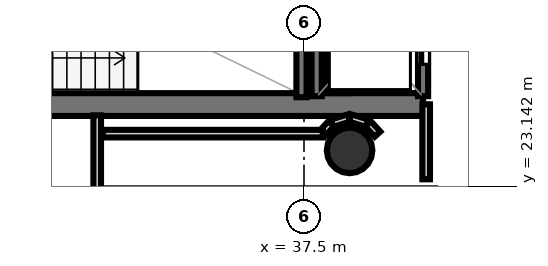
"""IFC4 building model, lengths in metres.
Left out: names, types, materials, properties, quantities, classifications, styles, units other than length and angle.
Written with IfcOpenShell. Run it as: python <this file> out.ifc"""

import sys

from ifc_helpers import new_model, si_unit, direction, frame, frame_2d, origin, origin_2d, place, context, subcontext, project, spatial, rectangle, hollow_circle, extrude, element, fill, save


model = new_model("IFC4")
c1 = context("Model", 3, precision=1e-05, world=origin(), true_north=direction((0.0, 1.0)))
c2 = subcontext(c1, "Body", "Model", "MODEL_VIEW")
j1 = project(units=[si_unit("LENGTHUNIT", "METRE"), si_unit("PLANEANGLEUNIT", "RADIAN")], contexts=[c1])
p1 = place(None, origin())
s1 = spatial("IfcSite", under=j1, at=p1, CompositionType="ELEMENT")
p2 = place(p1, origin())
s2 = spatial("IfcBuilding", under=s1, at=p2, CompositionType="ELEMENT")
p3 = place(p2, frame((0.0, 0.0, 299.1)))
s3 = spatial("IfcBuildingStorey", under=s2, at=p3, CompositionType="ELEMENT", Elevation=299.1)
p4 = place(p3, frame((29.33, 24.755, 0.0), z_axis=(0.0, 0.0, 1.0), x_axis=(1.0, 0.0, 0.0)))
e1 = element("IfcWall", 1, at=p4, inside=s3, PredefinedType="SHEAR", context=c2, shape_type="SweptSolid", body=[
    extrude(rectangle(XDim=10.52, YDim=0.45, at=frame_2d((5.26, 0.0))), origin(), (0.0, 0.0, 1.0), 3.52),
])
p5 = place(p4, frame((0.695, 0.0, 0.0)))
e2 = element("IfcOpeningElement", 2, at=p5, cuts=e1, PredefinedType="OPENING", context=c2, shape_type="SweptSolid", body=[
    extrude(rectangle(XDim=1.25, YDim=2.15, at=frame_2d((0.625, 1.075))), frame((0.0, 0.235, 0.0), z_axis=(0.0, -1.0, 0.0), x_axis=(1.0, 0.0, 0.0)), (0.0, 0.0, 1.0), 0.47),
])
p6 = place(p3, frame((38.18, 24.98, 0.0), z_axis=(0.0, 0.0, 1.0), x_axis=(0.0, 1.0, 0.0)))
e3 = element("IfcWall", 3, at=p6, inside=s3, PredefinedType="SHEAR", context=c2, shape_type="SweptSolid", body=[
    extrude(rectangle(XDim=7.44, YDim=0.45, at=frame_2d((3.72, 0.0))), origin(), (0.0, 0.0, 1.0), 3.52),
])
p7 = place(p3, frame((38.4, 23.85, 0.0), z_axis=(0.0, 0.0, 1.0), x_axis=(1.0, 0.0, 0.0)))
e4 = element("IfcColumn", 4, at=p7, inside=s3, PredefinedType="COLUMN", context=c2, shape_type="SweptSolid", body=[
    extrude(hollow_circle(Radius=0.45, WallThickness=0.025, at=origin_2d()), origin(), (0.0, 0.0, 1.0), 3.7),
])
p8 = place(p3, frame((37.45, 24.9, 0.0), z_axis=(0.0, 0.0, 1.0), x_axis=(0.0, 1.0, 0.0)))
e5 = element("IfcWall", 5, at=p8, inside=s3, PredefinedType="SOLIDWALL", context=c2, shape_type="SweptSolid", body=[
    extrude(rectangle(XDim=3.06, YDim=0.2, at=frame_2d((1.53, 0.0))), origin(), (0.0, 0.0, 1.0), 3.52),
])
p9 = place(p3, frame((39.85, 24.92, 0.0), z_axis=(0.0, 0.0, 1.0), x_axis=(0.0, 1.0, 0.0)))
e6 = element("IfcWall", 6, at=p9, inside=s3, PredefinedType="SOLIDWALL", context=c2, shape_type="SweptSolid", body=[
    extrude(rectangle(XDim=2.36, YDim=0.2, at=frame_2d((1.18, 0.0))), origin(), (0.0, 0.0, 1.0), 3.52),
])
p10 = place(p9, frame((0.63, 0.0, 0.0)))
e7 = element("IfcOpeningElement", 7, at=p10, cuts=e6, PredefinedType="OPENING", context=c2, shape_type="SweptSolid", body=[
    extrude(rectangle(XDim=1.1, YDim=2.15, at=frame_2d((0.55, 1.075))), frame((0.0, 0.11, 0.0), z_axis=(0.0, -1.0, 0.0), x_axis=(1.0, 0.0, 0.0)), (0.0, 0.0, 1.0), 0.22),
])
p11 = place(p3, frame((37.75, 24.92, 0.0), z_axis=(0.0, 0.0, 1.0), x_axis=(0.0, 1.0, 0.0)))
e8 = element("IfcWall", 8, at=p11, inside=s3, PredefinedType="SOLIDWALL", context=c2, shape_type="SweptSolid", body=[
    extrude(rectangle(XDim=2.36, YDim=0.2, at=frame_2d((1.18, 0.0))), origin(), (0.0, 0.0, 1.0), 3.52),
])
p12 = place(p3, frame((33.419, 24.542, 0.0), z_axis=(0.0, 0.0, 1.0), x_axis=(0.0, -1.0, 0.0)))
e9 = element("IfcWall", 9, at=p12, inside=s3, PredefinedType="PARTITIONING", context=c2, shape_type="SweptSolid", body=[
    extrude(rectangle(XDim=2.692, YDim=0.15, at=frame_2d((1.346, 0.0))), origin(), (0.0, 0.0, 1.0), 2.84),
])
p13 = place(p3, frame((39.911, 23.28, 0.0), z_axis=(0.0, 0.0, 1.0), x_axis=(0.0, 1.0, 0.0)))
e10 = element("IfcWall", 10, at=p13, inside=s3, PredefinedType="PARTITIONING", context=c2, shape_type="SweptSolid", body=[
    extrude(rectangle(XDim=1.48, YDim=0.15, at=frame_2d((0.74, 0.0))), origin(), (0.0, 0.0, 1.0), 2.84),
])
p14 = place(p3, frame((38.951, 24.171, 0.0), z_axis=(0.0, 0.0, 1.0), x_axis=(-0.674186852077, 0.738560822469, 0.0)))
e11 = element("IfcWall", 11, at=p14, inside=s3, PredefinedType="PARTITIONING", context=c2, shape_type="SweptSolid", body=[
    extrude(rectangle(XDim=0.281, YDim=0.15, at=frame_2d((0.14, 0.0))), origin(), (0.0, 0.0, 1.0), 2.84),
])
p15 = place(p3, frame((38.748, 24.387, 0.0), z_axis=(0.0, 0.0, 1.0), x_axis=(-0.956948991291, 0.290256142171, 0.0)))
e12 = element("IfcWall", 12, at=p15, inside=s3, PredefinedType="PARTITIONING", context=c2, shape_type="SweptSolid", body=[
    extrude(rectangle(XDim=0.354, YDim=0.15, at=frame_2d((0.177, 0.0))), origin(), (0.0, 0.0, 1.0), 2.84),
])
p16 = place(p3, frame((38.391, 24.49, 0.0), z_axis=(0.0, 0.0, 1.0), x_axis=(-0.957007018611, -0.290064762301, 0.0)))
e13 = element("IfcWall", 13, at=p16, inside=s3, PredefinedType="PARTITIONING", context=c2, shape_type="SweptSolid", body=[
    extrude(rectangle(XDim=0.354, YDim=0.15, at=frame_2d((0.177, 0.0))), origin(), (0.0, 0.0, 1.0), 2.84),
])
p17 = place(p3, frame((38.038, 24.378, 0.0), z_axis=(0.0, 0.0, 1.0), x_axis=(-0.673658387955, -0.739042878551, 0.0)))
e14 = element("IfcWall", 14, at=p17, inside=s3, PredefinedType="PARTITIONING", context=c2, shape_type="SweptSolid", body=[
    extrude(rectangle(XDim=0.246, YDim=0.15, at=frame_2d((0.123, 0.0))), origin(), (0.0, 0.0, 1.0), 2.84),
])
p18 = place(p3, frame((37.872, 24.181, 0.0), z_axis=(0.0, 0.0, 1.0), x_axis=(-1.0, 0.0, 0.0)))
e15 = element("IfcWall", 15, at=p18, inside=s3, PredefinedType="PARTITIONING", context=c2, shape_type="SweptSolid", body=[
    extrude(rectangle(XDim=4.342, YDim=0.15, at=frame_2d((2.171, 0.0))), origin(), (0.0, 0.0, 1.0), 2.84),
])
p19 = place(p3, frame((55.938, 37.275, 0.0), z_axis=(0.0, 0.0, 1.0), x_axis=(-0.504337097155, -0.863506857201, 0.0)))
e16 = element("IfcWall", 16, at=p19, inside=s3, PredefinedType="PARTITIONING", context=c2, shape_type="SweptSolid", body=[
    extrude(rectangle(XDim=35.169, YDim=0.105, at=frame_2d((17.585, 0.0))), origin(), (0.0, 0.0, 1.0), 2.84),
])
p20 = place(p10, origin())
e17 = element("IfcDoor", 17, at=p20, inside=s3, OperationType="SLIDING_TO_LEFT", PredefinedType="DOOR", context=c2, shape_type="SweptSolid", body=[
    extrude(rectangle(XDim=1.1, YDim=2.15, at=frame_2d((0.55, 1.075))), frame((0.0, 0.025, 0.0), z_axis=(0.0, -1.0, 0.0), x_axis=(1.0, 0.0, 0.0)), (0.0, 0.0, 1.0), 0.05),
])
fill(e7, e17)
save(model, sys.argv[1])
